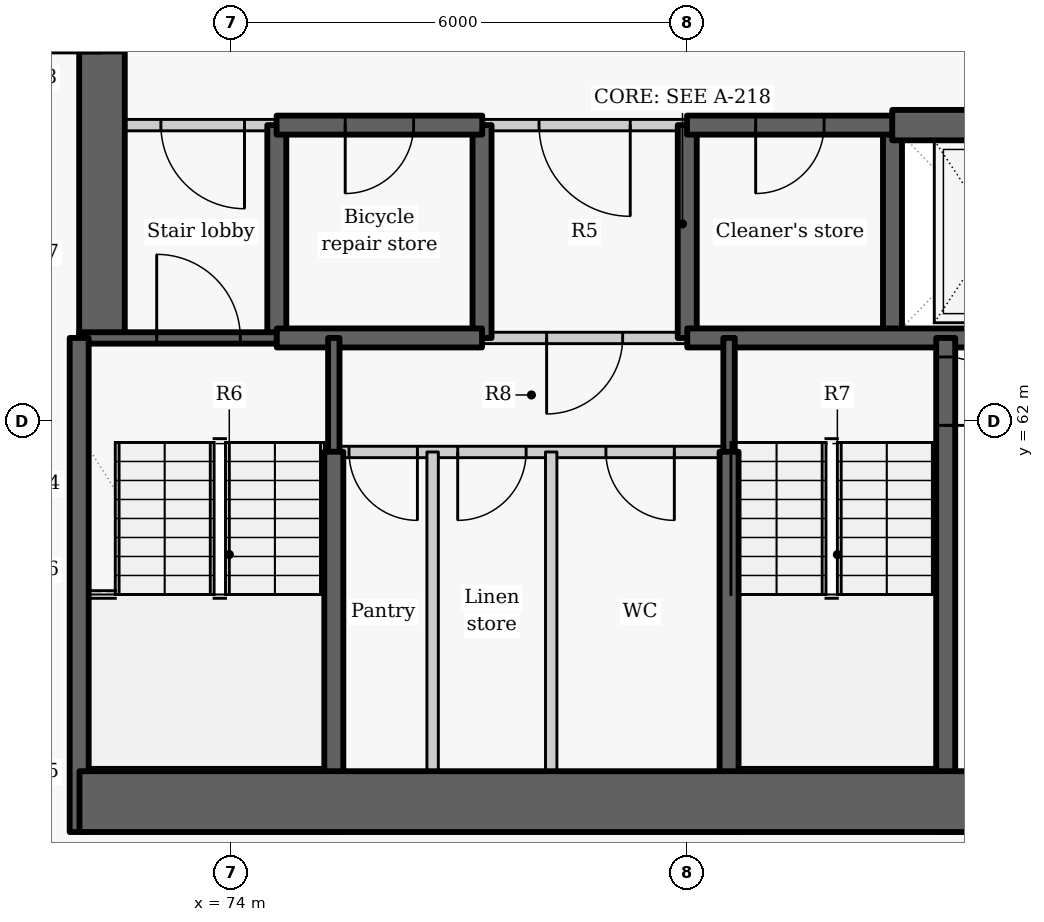
"""IFC4 building model, lengths in metres.
Left out: names, types, materials, properties, quantities, classifications, styles, units other than length and angle.
Written with IfcOpenShell. Run it as: python <this file> out.ifc"""

import sys

from ifc_helpers import new_model, si_unit, direction, frame, frame_2d, origin, place, context, subcontext, project, spatial, rectangle, extrude, element, fill, save


model = new_model("IFC4")
c1 = context("Model", 3, precision=1e-05, world=origin(), true_north=direction((0.0, 1.0)))
c2 = subcontext(c1, "Body", "Model", "MODEL_VIEW")
j1 = project(units=[si_unit("LENGTHUNIT", "METRE"), si_unit("PLANEANGLEUNIT", "RADIAN")], contexts=[c1])
p1 = place(None, origin())
s1 = spatial("IfcSite", under=j1, at=p1, CompositionType="ELEMENT")
p2 = place(p1, origin())
s2 = spatial("IfcBuilding", under=s1, at=p2, CompositionType="ELEMENT")
p3 = place(p2, frame((0.0, 0.0, 87.6)))
s3 = spatial("IfcBuildingStorey", under=s2, at=p3, CompositionType="ELEMENT", Elevation=87.6)
p4 = place(p3, frame((74.6, 63.1, -0.275), z_axis=(0.0, 0.0, 1.0), x_axis=(0.0, 1.0, 0.0)))
e1 = element("IfcWall", 1, at=p4, inside=s3, PredefinedType="SHEAR", context=c2, shape_type="SweptSolid", body=[
    extrude(rectangle(XDim=2.8, YDim=0.25, at=frame_2d((1.4, 0.0))), origin(), (0.0, 0.0, 1.0), 3.3),
])
p5 = place(p3, frame((72.3, 63.1, -0.275), z_axis=(0.0, 0.0, 1.0), x_axis=(0.0, 1.0, 0.0)))
e2 = element("IfcWall", 2, at=p5, inside=s3, PredefinedType="SHEAR", context=c2, shape_type="SweptSolid", body=[
    extrude(rectangle(XDim=9.1, YDim=0.6, at=frame_2d((4.55, 0.0))), origin(), (0.0, 0.0, 1.0), 3.3),
])
p6 = place(p5, frame((3.75, 0.0, 0.275)))
e3 = element("IfcOpeningElement", 3, at=p6, cuts=e2, PredefinedType="OPENING", context=c2, shape_type="SweptSolid", body=[
    extrude(rectangle(XDim=1.5, YDim=2.1, at=frame_2d((0.75, 1.05))), frame((0.0, 0.31, 0.0), z_axis=(0.0, -1.0, 0.0), x_axis=(1.0, 0.0, 0.0)), (0.0, 0.0, 1.0), 0.62),
])
for number, where, z_axis, x_axis in (
    (4, (77.3, 63.1, -0.275), (0.0, 0.0, 1.0), (0.0, 1.0, 0.0)),
    (5, (80.0, 63.1, -0.275), (0.0, 0.0, 1.0), (0.0, 1.0, 0.0)),
    (6, (82.7, 63.1, -0.275), (0.0, 0.0, 1.0), (0.0, 1.0, 0.0)),
):
    element("IfcWall", number, at=place(p3, frame(where, z_axis=z_axis, x_axis=x_axis)), inside=s3, PredefinedType="SHEAR", context=c2, shape_type="SweptSolid", body=[
        extrude(rectangle(XDim=2.8, YDim=0.25, at=frame_2d((1.4, 0.0))), origin(), (0.0, 0.0, 1.0), 3.3),
    ])
p7 = place(p3, frame((74.603, 65.9, 0.0), z_axis=(0.0, 0.0, 1.0), x_axis=(-1.0, 0.0, 0.0)))
e7 = element("IfcWall", 7, at=p7, inside=s3, PredefinedType="PARTITIONING", context=c2, shape_type="SweptSolid", body=[
    extrude(rectangle(XDim=2.603, YDim=0.15, at=frame_2d((1.302, 0.0))), origin(), (0.0, 0.0, 1.0), 3.025),
])
p8 = place(p7, frame((0.428, 0.0, 0.0)))
e8 = element("IfcOpeningElement", 8, at=p8, cuts=e7, PredefinedType="OPENING", context=c2, shape_type="SweptSolid", body=[
    extrude(rectangle(XDim=1.1, YDim=2.1, at=frame_2d((0.55, 1.05))), frame((0.0, 0.085, 0.0), z_axis=(0.0, -1.0, 0.0), x_axis=(1.0, 0.0, 0.0)), (0.0, 0.0, 1.0), 0.17),
])
p9 = place(p3, frame((80.003, 65.9, 0.0), z_axis=(0.0, 0.0, 1.0), x_axis=(-1.0, 0.0, 0.0)))
e9 = element("IfcWall", 9, at=p9, inside=s3, PredefinedType="PARTITIONING", context=c2, shape_type="SweptSolid", body=[
    extrude(rectangle(XDim=2.706, YDim=0.15, at=frame_2d((1.353, 0.0))), origin(), (0.0, 0.0, 1.0), 3.025),
])
p10 = place(p9, frame((0.753, 0.0, 0.0)))
e10 = element("IfcOpeningElement", 10, at=p10, cuts=e9, PredefinedType="OPENING", context=c2, shape_type="SweptSolid", body=[
    extrude(rectangle(XDim=1.2, YDim=2.1, at=frame_2d((0.6, 1.05))), frame((0.0, 0.085, 0.0), z_axis=(0.0, -1.0, 0.0), x_axis=(1.0, 0.0, 0.0)), (0.0, 0.0, 1.0), 0.17),
])
p11 = place(p3, frame((77.303, 65.9, -0.275), z_axis=(0.0, 0.0, 1.0), x_axis=(-1.0, 0.0, 0.0)))
e11 = element("IfcWall", 11, at=p11, inside=s3, PredefinedType="SHEAR", context=c2, shape_type="SweptSolid", body=[
    extrude(rectangle(XDim=2.706, YDim=0.25, at=frame_2d((1.353, 0.0))), origin(), (0.0, 0.0, 1.0), 3.3),
])
p12 = place(p11, frame((0.903, 0.0, 0.275)))
e12 = element("IfcOpeningElement", 12, at=p12, cuts=e11, PredefinedType="OPENING", context=c2, shape_type="SweptSolid", body=[
    extrude(rectangle(XDim=0.9, YDim=2.1, at=frame_2d((0.45, 1.05))), frame((0.0, 0.135, 0.0), z_axis=(0.0, -1.0, 0.0), x_axis=(1.0, 0.0, 0.0)), (0.0, 0.0, 1.0), 0.27),
])
p13 = place(p3, frame((82.703, 65.9, -0.275), z_axis=(0.0, 0.0, 1.0), x_axis=(-1.0, 0.0, 0.0)))
e13 = element("IfcWall", 13, at=p13, inside=s3, PredefinedType="SHEAR", context=c2, shape_type="SweptSolid", body=[
    extrude(rectangle(XDim=2.706, YDim=0.25, at=frame_2d((1.353, 0.0))), origin(), (0.0, 0.0, 1.0), 3.3),
])
p14 = place(p13, frame((0.903, 0.0, 0.275)))
e14 = element("IfcOpeningElement", 14, at=p14, cuts=e13, PredefinedType="OPENING", context=c2, shape_type="SweptSolid", body=[
    extrude(rectangle(XDim=0.9, YDim=2.1, at=frame_2d((0.45, 1.05))), frame((0.0, 0.135, 0.0), z_axis=(0.0, -1.0, 0.0), x_axis=(1.0, 0.0, 0.0)), (0.0, 0.0, 1.0), 0.27),
])
p15 = place(p3, frame((82.697, 65.9, -0.275), z_axis=(0.0, 0.0, 1.0), x_axis=(1.0, 0.0, 0.0)))
e15 = element("IfcWall", 15, at=p15, inside=s3, PredefinedType="SHEAR", context=c2, shape_type="SweptSolid", body=[
    extrude(rectangle(XDim=2.706, YDim=0.4, at=frame_2d((1.353, 0.0))), origin(), (0.0, 0.0, 1.0), 3.3),
])
p16 = place(p3, frame((72.0, 63.1, -0.275), z_axis=(0.0, 0.0, 1.0), x_axis=(1.0, 0.0, 0.0)))
e16 = element("IfcWall", 16, at=p16, inside=s3, PredefinedType="SHEAR", context=c2, shape_type="SweptSolid", body=[
    extrude(rectangle(XDim=2.6, YDim=0.15, at=frame_2d((1.3, 0.0))), origin(), (0.0, 0.0, 1.0), 3.3),
])
p17 = place(p16, frame((1.02, 0.0, 0.275)))
e17 = element("IfcOpeningElement", 17, at=p17, cuts=e16, PredefinedType="OPENING", context=c2, shape_type="SweptSolid", body=[
    extrude(rectangle(XDim=1.1, YDim=2.1, at=frame_2d((0.55, 1.05))), frame((0.0, 0.085, 0.0), z_axis=(0.0, -1.0, 0.0), x_axis=(1.0, 0.0, 0.0)), (0.0, 0.0, 1.0), 0.17),
])
p18 = place(p3, frame((74.6, 63.1, -0.275), z_axis=(0.0, 0.0, 1.0), x_axis=(1.0, 0.0, 0.0)))
e18 = element("IfcWall", 18, at=p18, inside=s3, PredefinedType="SHEAR", context=c2, shape_type="SweptSolid", body=[
    extrude(rectangle(XDim=2.7, YDim=0.25, at=frame_2d((1.35, 0.0))), origin(), (0.0, 0.0, 1.0), 3.3),
])
p19 = place(p3, frame((80.0, 63.1, -0.275), z_axis=(0.0, 0.0, 1.0), x_axis=(1.0, 0.0, 0.0)))
e19 = element("IfcWall", 19, at=p19, inside=s3, PredefinedType="SHEAR", context=c2, shape_type="SweptSolid", body=[
    extrude(rectangle(XDim=8.0, YDim=0.25, at=frame_2d((4.0, 0.0))), origin(), (0.0, 0.0, 1.0), 3.3),
])
p20 = place(p19, frame((3.849, 0.0, 0.275)))
e20 = element("IfcOpeningElement", 20, at=p20, cuts=e19, PredefinedType="OPENING", context=c2, shape_type="SweptSolid", body=[
    extrude(rectangle(XDim=1.1, YDim=2.1, at=frame_2d((0.55, 1.05))), frame((0.0, 0.135, 0.0), z_axis=(0.0, -1.0, 0.0), x_axis=(1.0, 0.0, 0.0)), (0.0, 0.0, 1.0), 0.27),
])
p21 = place(p3, frame((80.0, 63.1, 0.0), z_axis=(0.0, 0.0, 1.0), x_axis=(-1.0, 0.0, 0.0)))
e21 = element("IfcWall", 21, at=p21, inside=s3, PredefinedType="PARTITIONING", context=c2, shape_type="SweptSolid", body=[
    extrude(rectangle(XDim=2.7, YDim=0.15, at=frame_2d((1.35, 0.0))), origin(), (0.0, 0.0, 1.0), 3.025),
])
p22 = place(p21, frame((0.85, 0.0, 0.0)))
e22 = element("IfcOpeningElement", 22, at=p22, cuts=e21, PredefinedType="OPENING", context=c2, shape_type="SweptSolid", body=[
    extrude(rectangle(XDim=1.0, YDim=2.1, at=frame_2d((0.5, 1.05))), frame((0.0, 0.085, 0.0), z_axis=(0.0, -1.0, 0.0), x_axis=(1.0, 0.0, 0.0)), (0.0, 0.0, 1.0), 0.17),
])
p23 = place(p3, frame((75.35, 61.597, -0.275), z_axis=(0.0, 0.0, 1.0), x_axis=(0.0, 1.0, 0.0)))
e23 = element("IfcWall", 23, at=p23, inside=s3, PredefinedType="SHEAR", context=c2, shape_type="SweptSolid", body=[
    extrude(rectangle(XDim=1.503, YDim=0.15, at=frame_2d((0.751, 0.0))), origin(), (0.0, 0.0, 1.0), 3.3),
])
p24 = place(p3, frame((75.35, 56.6, -0.275), z_axis=(0.0, 0.0, 1.0), x_axis=(0.0, 1.0, 0.0)))
e24 = element("IfcWall", 24, at=p24, inside=s3, PredefinedType="SHEAR", context=c2, shape_type="SweptSolid", body=[
    extrude(rectangle(XDim=5.003, YDim=0.25, at=frame_2d((2.501, 0.0))), origin(), (0.0, 0.0, 1.0), 3.3),
])
p25 = place(p3, frame((72.0, 56.6, -0.275), z_axis=(0.0, 0.0, 1.0), x_axis=(0.0, 1.0, 0.0)))
e25 = element("IfcWall", 25, at=p25, inside=s3, PredefinedType="SHEAR", context=c2, shape_type="SweptSolid", body=[
    extrude(rectangle(XDim=6.5, YDim=0.25, at=frame_2d((3.25, 0.0))), origin(), (0.0, 0.0, 1.0), 3.3),
])
p26 = place(p3, frame((83.4, 63.1, -0.275), z_axis=(0.0, 0.0, 1.0), x_axis=(0.0, -1.0, 0.0)))
e26 = element("IfcWall", 26, at=p26, inside=s3, PredefinedType="SHEAR", context=c2, shape_type="SweptSolid", body=[
    extrude(rectangle(XDim=6.5, YDim=0.25, at=frame_2d((3.25, 0.0))), origin(), (0.0, 0.0, 1.0), 3.3),
])
p27 = place(p26, frame((0.25, 0.0, 0.275)))
e27 = element("IfcOpeningElement", 27, at=p27, cuts=e26, PredefinedType="OPENING", context=c2, shape_type="SweptSolid", body=[
    extrude(rectangle(XDim=0.9, YDim=2.1, at=frame_2d((0.45, 1.05))), frame((0.0, 0.135, 0.0), z_axis=(0.0, -1.0, 0.0), x_axis=(1.0, 0.0, 0.0)), (0.0, 0.0, 1.0), 0.27),
])
p28 = place(p3, frame((80.55, 61.597, -0.275), z_axis=(0.0, 0.0, 1.0), x_axis=(0.0, 1.0, 0.0)))
e28 = element("IfcWall", 28, at=p28, inside=s3, PredefinedType="SHEAR", context=c2, shape_type="SweptSolid", body=[
    extrude(rectangle(XDim=1.503, YDim=0.15, at=frame_2d((0.751, 0.0))), origin(), (0.0, 0.0, 1.0), 3.3),
])
p29 = place(p3, frame((80.55, 56.6, -0.275), z_axis=(0.0, 0.0, 1.0), x_axis=(0.0, 1.0, 0.0)))
e29 = element("IfcWall", 29, at=p29, inside=s3, PredefinedType="SHEAR", context=c2, shape_type="SweptSolid", body=[
    extrude(rectangle(XDim=5.003, YDim=0.25, at=frame_2d((2.501, 0.0))), origin(), (0.0, 0.0, 1.0), 3.3),
])
p30 = place(p3, frame((80.55, 61.6, 0.0), z_axis=(0.0, 0.0, 1.0), x_axis=(-1.0, 0.0, 0.0)))
e30 = element("IfcWall", 30, at=p30, inside=s3, PredefinedType="PARTITIONING", context=c2, shape_type="SweptSolid", body=[
    extrude(rectangle(XDim=5.2, YDim=0.15, at=frame_2d((2.6, 0.0))), origin(), (0.0, 0.0, 1.0), 3.025),
])
p31 = place(p30, frame((4.1, 0.0, 0.0)))
e31 = element("IfcOpeningElement", 31, at=p31, cuts=e30, PredefinedType="OPENING", context=c2, shape_type="SweptSolid", body=[
    extrude(rectangle(XDim=0.9, YDim=2.1, at=frame_2d((0.45, 1.05))), frame((0.0, 0.085, 0.0), z_axis=(0.0, -1.0, 0.0), x_axis=(1.0, 0.0, 0.0)), (0.0, 0.0, 1.0), 0.17),
])
p32 = place(p30, frame((2.67, 0.0, 0.0)))
e32 = element("IfcOpeningElement", 32, at=p32, cuts=e30, PredefinedType="OPENING", context=c2, shape_type="SweptSolid", body=[
    extrude(rectangle(XDim=0.9, YDim=2.1, at=frame_2d((0.45, 1.05))), frame((0.0, 0.085, 0.0), z_axis=(0.0, -1.0, 0.0), x_axis=(1.0, 0.0, 0.0)), (0.0, 0.0, 1.0), 0.17),
])
p33 = place(p30, frame((0.72, 0.0, 0.0)))
e33 = element("IfcOpeningElement", 33, at=p33, cuts=e30, PredefinedType="OPENING", context=c2, shape_type="SweptSolid", body=[
    extrude(rectangle(XDim=0.9, YDim=2.1, at=frame_2d((0.45, 1.05))), frame((0.0, 0.085, 0.0), z_axis=(0.0, -1.0, 0.0), x_axis=(1.0, 0.0, 0.0)), (0.0, 0.0, 1.0), 0.17),
])
for number, where, z_axis, x_axis in (
    (34, (76.65, 56.6, 0.0), (0.0, 0.0, 1.0), (0.0, 1.0, 0.0)),
    (35, (78.21, 56.6, 0.0), (0.0, 0.0, 1.0), (0.0, 1.0, 0.0)),
):
    element("IfcWall", number, at=place(p3, frame(where, z_axis=z_axis, x_axis=x_axis)), inside=s3, PredefinedType="PARTITIONING", context=c2, shape_type="SweptSolid", body=[
        extrude(rectangle(XDim=5.0, YDim=0.15, at=frame_2d((2.5, 0.0))), origin(), (0.0, 0.0, 1.0), 3.025),
    ])
p34 = place(p3, frame((72.004, 57.0, -0.275), z_axis=(0.0, 0.0, 1.0), x_axis=(1.0, 0.0, 0.0)))
e36 = element("IfcWall", 36, at=p34, inside=s3, PredefinedType="SHEAR", context=c2, shape_type="SweptSolid", body=[
    extrude(rectangle(XDim=15.992, YDim=0.8, at=frame_2d((7.996, 0.0))), origin(), (0.0, 0.0, 1.0), 3.3),
])
p35 = place(p8, origin())
e37 = element("IfcDoor", 37, at=p35, inside=s3, OperationType="SINGLE_SWING_LEFT", PredefinedType="DOOR", context=c2, shape_type="SweptSolid", body=[
    extrude(rectangle(XDim=1.1, YDim=2.1, at=frame_2d((0.55, 1.05))), frame((0.0, 0.025, 0.0), z_axis=(0.0, -1.0, 0.0), x_axis=(1.0, 0.0, 0.0)), (0.0, 0.0, 1.0), 0.05),
])
fill(e8, e37)
p36 = place(p12, origin())
e38 = element("IfcDoor", 38, at=p36, inside=s3, OperationType="SINGLE_SWING_RIGHT", PredefinedType="DOOR", context=c2, shape_type="SweptSolid", body=[
    extrude(rectangle(XDim=0.9, YDim=2.1, at=frame_2d((0.45, 1.05))), frame((0.0, 0.025, 0.0), z_axis=(0.0, -1.0, 0.0), x_axis=(1.0, 0.0, 0.0)), (0.0, 0.0, 1.0), 0.05),
])
fill(e12, e38)
p37 = place(p10, origin())
e39 = element("IfcDoor", 39, at=p37, inside=s3, OperationType="DOUBLE_DOOR_SINGLE_SWING", PredefinedType="DOOR", context=c2, shape_type="SweptSolid", body=[
    extrude(rectangle(XDim=1.2, YDim=2.1, at=frame_2d((0.6, 1.05))), frame((0.0, 0.025, 0.0), z_axis=(0.0, -1.0, 0.0), x_axis=(1.0, 0.0, 0.0)), (0.0, 0.0, 1.0), 0.05),
])
fill(e10, e39)
p38 = place(p14, origin())
e40 = element("IfcDoor", 40, at=p38, inside=s3, OperationType="SINGLE_SWING_RIGHT", PredefinedType="DOOR", context=c2, shape_type="SweptSolid", body=[
    extrude(rectangle(XDim=0.9, YDim=2.1, at=frame_2d((0.45, 1.05))), frame((0.0, 0.025, 0.0), z_axis=(0.0, -1.0, 0.0), x_axis=(1.0, 0.0, 0.0)), (0.0, 0.0, 1.0), 0.05),
])
fill(e14, e40)
p39 = place(p22, origin())
e41 = element("IfcDoor", 41, at=p39, inside=s3, OperationType="SINGLE_SWING_RIGHT", PredefinedType="DOOR", context=c2, shape_type="SweptSolid", body=[
    extrude(rectangle(XDim=1.0, YDim=2.1, at=frame_2d((0.5, 1.05))), frame((0.0, 0.025, 0.0), z_axis=(0.0, -1.0, 0.0), x_axis=(1.0, 0.0, 0.0)), (0.0, 0.0, 1.0), 0.05),
])
fill(e22, e41)
p40 = place(p31, origin())
e42 = element("IfcDoor", 42, at=p40, inside=s3, OperationType="SINGLE_SWING_LEFT", PredefinedType="DOOR", context=c2, shape_type="SweptSolid", body=[
    extrude(rectangle(XDim=0.9, YDim=2.1, at=frame_2d((0.45, 1.05))), frame((0.0, 0.025, 0.0), z_axis=(0.0, -1.0, 0.0), x_axis=(1.0, 0.0, 0.0)), (0.0, 0.0, 1.0), 0.05),
])
fill(e31, e42)
p41 = place(p32, origin())
e43 = element("IfcDoor", 43, at=p41, inside=s3, OperationType="SINGLE_SWING_RIGHT", PredefinedType="DOOR", context=c2, shape_type="SweptSolid", body=[
    extrude(rectangle(XDim=0.9, YDim=2.1, at=frame_2d((0.45, 1.05))), frame((0.0, 0.025, 0.0), z_axis=(0.0, -1.0, 0.0), x_axis=(1.0, 0.0, 0.0)), (0.0, 0.0, 1.0), 0.05),
])
fill(e32, e43)
p42 = place(p33, origin())
e44 = element("IfcDoor", 44, at=p42, inside=s3, OperationType="SINGLE_SWING_LEFT", PredefinedType="DOOR", context=c2, shape_type="SweptSolid", body=[
    extrude(rectangle(XDim=0.9, YDim=2.1, at=frame_2d((0.45, 1.05))), frame((0.0, 0.025, 0.0), z_axis=(0.0, -1.0, 0.0), x_axis=(1.0, 0.0, 0.0)), (0.0, 0.0, 1.0), 0.05),
])
fill(e33, e44)
p43 = place(p17, origin())
e45 = element("IfcDoor", 45, at=p43, inside=s3, OperationType="SINGLE_SWING_LEFT", PredefinedType="DOOR", context=c2, shape_type="SweptSolid", body=[
    extrude(rectangle(XDim=1.1, YDim=2.1, at=frame_2d((0.55, 1.05))), frame((0.0, 0.025, 0.0), z_axis=(0.0, -1.0, 0.0), x_axis=(1.0, 0.0, 0.0)), (0.0, 0.0, 1.0), 0.05),
])
fill(e17, e45)
p44 = place(p27, origin())
e46 = element("IfcDoor", 46, at=p44, inside=s3, OperationType="SINGLE_SWING_RIGHT", PredefinedType="DOOR", context=c2, shape_type="SweptSolid", body=[
    extrude(rectangle(XDim=0.9, YDim=2.1, at=frame_2d((0.45, 1.05))), frame((0.0, 0.025, 0.0), z_axis=(0.0, -1.0, 0.0), x_axis=(1.0, 0.0, 0.0)), (0.0, 0.0, 1.0), 0.05),
])
fill(e27, e46)
save(model, sys.argv[1])
